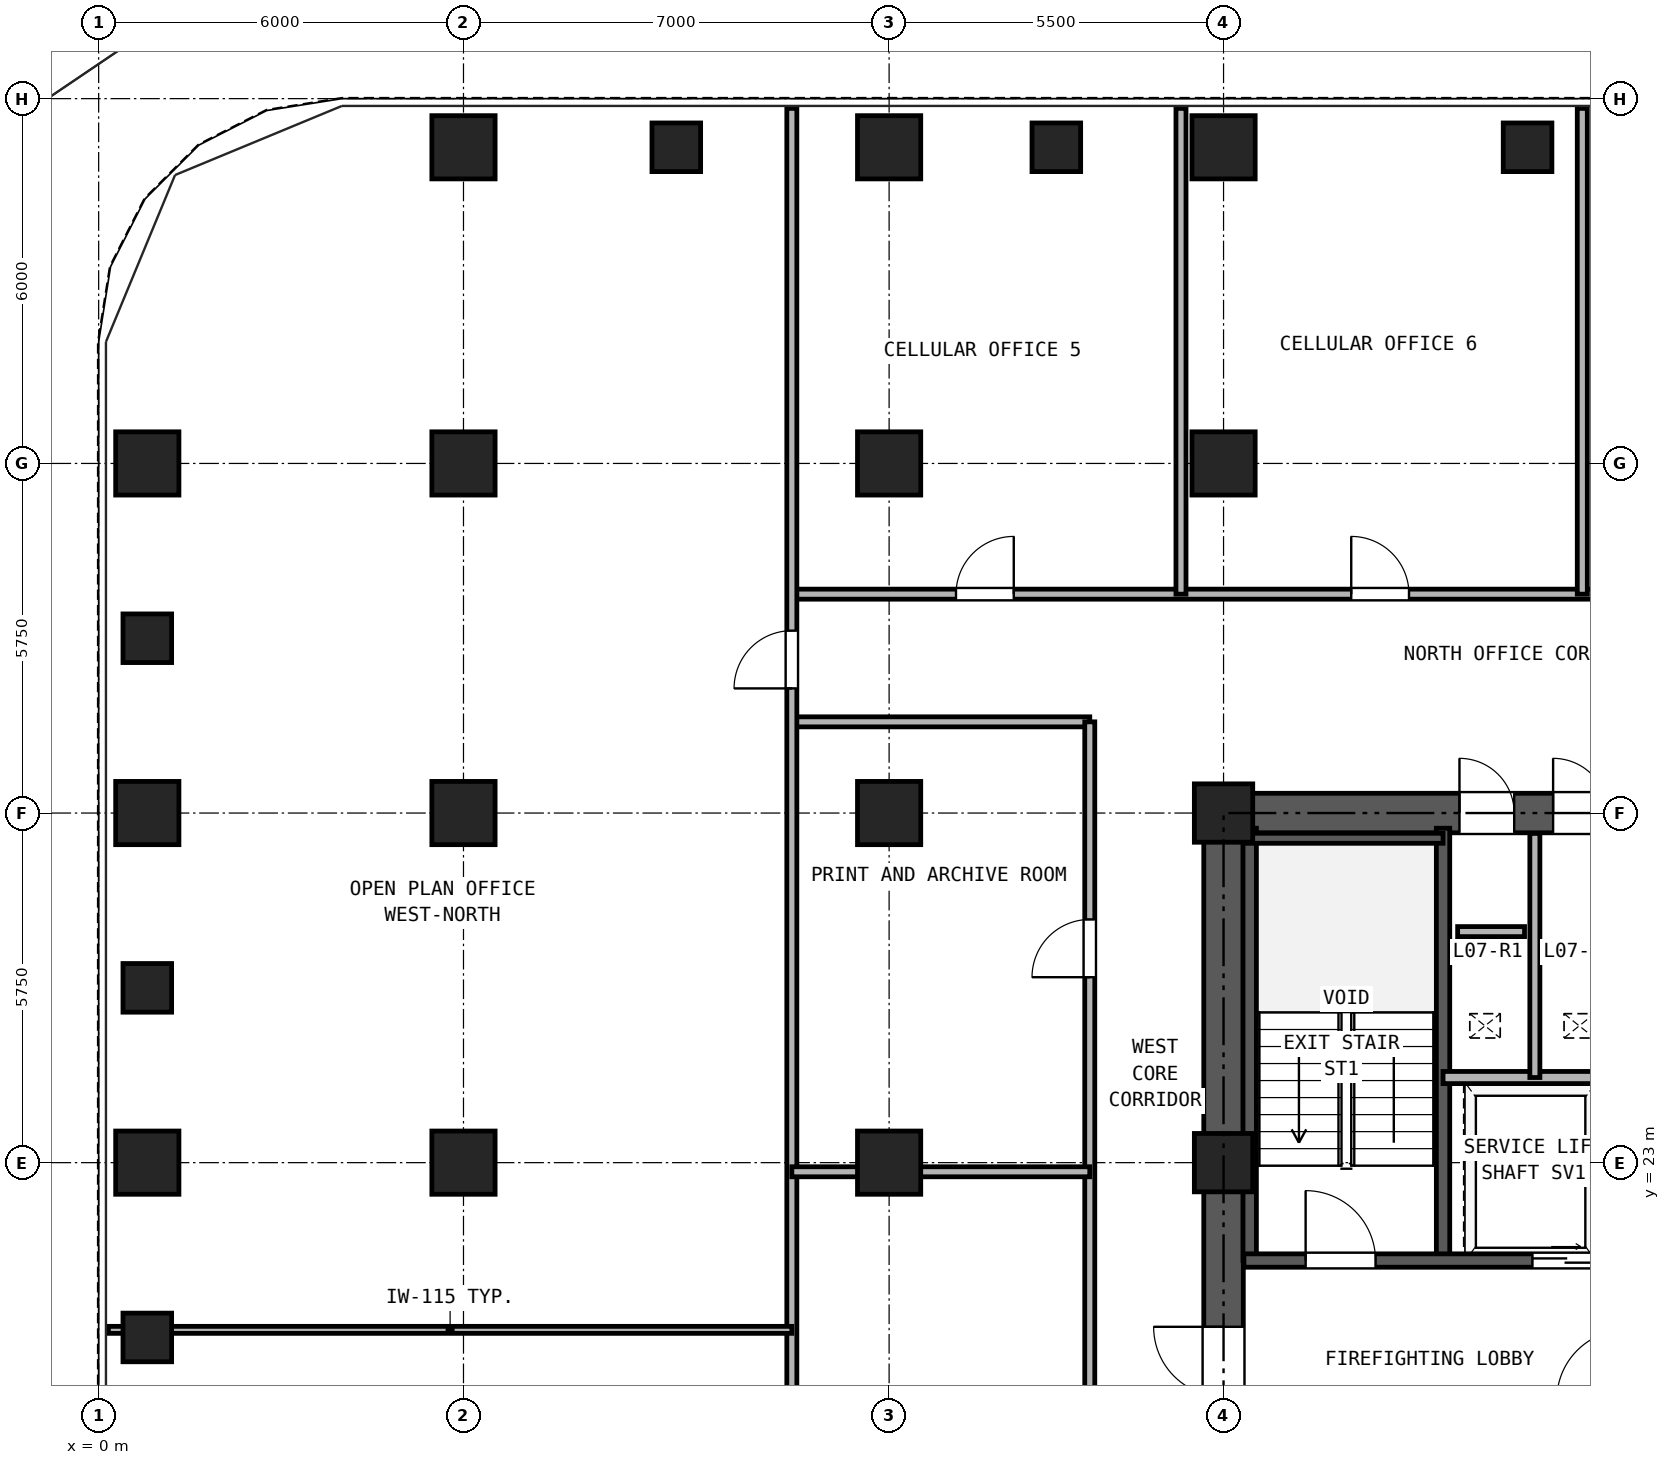
"""IFC4 building model, lengths in metres.
Left out: names, types, materials, properties, quantities, classifications, styles, units other than length and angle.
Written with IfcOpenShell. Run it as: python <this file> out.ifc"""

import sys

from ifc_helpers import new_model, si_unit, direction, frame, frame_2d, origin, origin_2d, place, context, subcontext, project, spatial, rectangle, hollow_rectangle, extrude, source, transform, mapped, element, fill, save


model = new_model("IFC4")
c1 = context("Model", 3, precision=1e-05, world=origin(), true_north=direction((0.0, 1.0)))
c2 = subcontext(c1, "Body", "Model", "MODEL_VIEW")
j1 = project(units=[si_unit("LENGTHUNIT", "METRE"), si_unit("PLANEANGLEUNIT", "RADIAN")], contexts=[c1])
p1 = place(None, origin())
s1 = spatial("IfcSite", under=j1, at=p1, CompositionType="ELEMENT")
p2 = place(p1, origin())
s2 = spatial("IfcBuilding", under=s1, at=p2, CompositionType="ELEMENT")
p3 = place(p2, frame((0.0, 0.0, 29.7)))
s3 = spatial("IfcBuildingStorey", under=s2, at=p3, CompositionType="ELEMENT", Elevation=29.7)
m1 = source(origin(), c2, "Body", "SweptSolid", [
    extrude(hollow_rectangle(XDim=1.04, YDim=1.04, WallThickness=0.065, at=origin_2d()), origin(), (0.0, 0.0, 1.0), 3.32),
])
for number, where, z_axis, x_axis in (
    (1, (6.0, 39.7, 0.0), (0.0, 0.0, 1.0), (1.0, 0.0, 0.0)),
    (2, (13.0, 39.7, 0.0), (0.0, 0.0, 1.0), (1.0, 0.0, 0.0)),
    (3, (18.5, 39.7, 0.0), (0.0, 0.0, 1.0), (1.0, 0.0, 0.0)),
    (4, (0.8, 23.0, 0.0), (0.0, 0.0, 1.0), (1.0, 0.0, 0.0)),
    (5, (0.8, 28.75, 0.0), (0.0, 0.0, 1.0), (1.0, 0.0, 0.0)),
    (6, (0.8, 34.5, 0.0), (0.0, 0.0, 1.0), (1.0, 0.0, 0.0)),
    (7, (6.0, 23.0, 0.0), (0.0, 0.0, 1.0), (1.0, 0.0, 0.0)),
    (8, (6.0, 28.75, 0.0), (0.0, 0.0, 1.0), (1.0, 0.0, 0.0)),
    (9, (6.0, 34.5, 0.0), (0.0, 0.0, 1.0), (1.0, 0.0, 0.0)),
    (10, (13.0, 23.0, 0.0), (0.0, 0.0, 1.0), (1.0, 0.0, 0.0)),
    (11, (13.0, 28.75, 0.0), (0.0, 0.0, 1.0), (1.0, 0.0, 0.0)),
    (12, (13.0, 34.5, 0.0), (0.0, 0.0, 1.0), (1.0, 0.0, 0.0)),
):
    element("IfcColumn", number, at=place(p3, frame(where, z_axis=z_axis, x_axis=x_axis)), inside=s3, PredefinedType="COLUMN", context=c2, shape_type="MappedRepresentation", body=[
        mapped(m1, transform((0.0, 0.0, 0.0), x_axis=(1.0, 0.0, 0.0), y_axis=(0.0, 1.0, 0.0), z_axis=(0.0, 0.0, 1.0), scale=1.0)),
    ])
m2 = source(origin(), c2, "Body", "SweptSolid", [
    extrude(hollow_rectangle(XDim=0.96, YDim=0.96, WallThickness=0.06, at=origin_2d()), origin(), (0.0, 0.0, 1.0), 3.32),
])
for number, where, z_axis, x_axis in (
    (13, (18.5, 23.0, 0.0), (0.0, 0.0, 1.0), (1.0, 0.0, 0.0)),
    (14, (18.5, 28.75, 0.0), (0.0, 0.0, 1.0), (1.0, 0.0, 0.0)),
):
    element("IfcColumn", number, at=place(p3, frame(where, z_axis=z_axis, x_axis=x_axis)), inside=s3, PredefinedType="COLUMN", context=c2, shape_type="MappedRepresentation", body=[
        mapped(m2, transform((0.0, 0.0, 0.0), x_axis=(1.0, 0.0, 0.0), y_axis=(0.0, 1.0, 0.0), z_axis=(0.0, 0.0, 1.0), scale=1.0)),
    ])
p4 = place(p3, frame((18.5, 34.5, 0.0), z_axis=(0.0, 0.0, 1.0), x_axis=(1.0, 0.0, 0.0)))
e15 = element("IfcColumn", 15, at=p4, inside=s3, PredefinedType="COLUMN", context=c2, shape_type="MappedRepresentation", body=[
    mapped(m1, transform((0.0, 0.0, 0.0), x_axis=(1.0, 0.0, 0.0), y_axis=(0.0, 1.0, 0.0), z_axis=(0.0, 0.0, 1.0), scale=1.0)),
])
m3 = source(origin(), c2, "Body", "SweptSolid", [
    extrude(hollow_rectangle(XDim=0.8, YDim=0.8, WallThickness=0.045, at=origin_2d()), origin(), (0.0, 0.0, 1.0), 3.32),
])
for number, where, z_axis, x_axis in (
    (16, (9.5, 39.7, 0.0), (0.0, 0.0, 1.0), (1.0, 0.0, 0.0)),
    (17, (15.75, 39.7, 0.0), (0.0, 0.0, 1.0), (1.0, 0.0, 0.0)),
    (18, (23.5, 39.7, 0.0), (0.0, 0.0, 1.0), (1.0, 0.0, 0.0)),
    (19, (0.8, 20.125, 0.0), (0.0, 0.0, 1.0), (1.0, 0.0, 0.0)),
    (20, (0.8, 25.875, 0.0), (0.0, 0.0, 1.0), (1.0, 0.0, 0.0)),
    (21, (0.8, 31.625, 0.0), (0.0, 0.0, 1.0), (1.0, 0.0, 0.0)),
):
    element("IfcColumn", number, at=place(p3, frame(where, z_axis=z_axis, x_axis=x_axis)), inside=s3, PredefinedType="COLUMN", context=c2, shape_type="MappedRepresentation", body=[
        mapped(m3, transform((0.0, 0.0, 0.0), x_axis=(1.0, 0.0, 0.0), y_axis=(0.0, 1.0, 0.0), z_axis=(0.0, 0.0, 1.0), scale=1.0)),
    ])
p5 = place(p3, frame((18.175, 28.75, 0.0), z_axis=(0.0, 0.0, 1.0), x_axis=(1.0, 0.0, 0.0)))
e22 = element("IfcWall", 22, at=p5, inside=s3, PredefinedType="SHEAR", context=c2, shape_type="SweptSolid", body=[
    extrude(rectangle(XDim=10.65, YDim=0.65, at=frame_2d((5.325, 0.0))), origin(), (0.0, 0.0, 1.0), 3.32),
])
p6 = place(p5, frame((4.205, 0.0, 0.0)))
e23 = element("IfcOpeningElement", 23, at=p6, cuts=e22, PredefinedType="OPENING", context=c2, shape_type="SweptSolid", body=[
    extrude(rectangle(XDim=0.9, YDim=2.05, at=frame_2d((0.45, 1.025))), frame((0.0, 0.335, 0.0), z_axis=(0.0, -1.0, 0.0), x_axis=(1.0, 0.0, 0.0)), (0.0, 0.0, 1.0), 0.67),
])
p7 = place(p5, frame((5.745, 0.0, 0.0)))
e24 = element("IfcOpeningElement", 24, at=p7, cuts=e22, PredefinedType="OPENING", context=c2, shape_type="SweptSolid", body=[
    extrude(rectangle(XDim=0.9, YDim=2.05, at=frame_2d((0.45, 1.025))), frame((0.0, 0.335, 0.0), z_axis=(0.0, -1.0, 0.0), x_axis=(1.0, 0.0, 0.0)), (0.0, 0.0, 1.0), 0.67),
])
p8 = place(p3, frame((18.5, 11.825, 0.0), z_axis=(0.0, 0.0, 1.0), x_axis=(0.0, 1.0, 0.0)))
e25 = element("IfcWall", 25, at=p8, inside=s3, PredefinedType="SHEAR", context=c2, shape_type="SweptSolid", body=[
    extrude(rectangle(XDim=16.6, YDim=0.65, at=frame_2d((8.3, 0.0))), origin(), (0.0, 0.0, 1.0), 3.32),
])
p9 = place(p8, frame((7.325, 0.0, 0.0)))
e26 = element("IfcOpeningElement", 26, at=p9, cuts=e25, PredefinedType="OPENING", context=c2, shape_type="SweptSolid", body=[
    extrude(rectangle(XDim=1.15, YDim=2.2, at=frame_2d((0.575, 1.1))), frame((0.0, 0.335, 0.0), z_axis=(0.0, -1.0, 0.0), x_axis=(1.0, 0.0, 0.0)), (0.0, 0.0, 1.0), 0.67),
])
for number, where, z_axis, x_axis in (
    (27, (18.93, 21.39, 0.0), (0.0, 0.0, 1.0), (0.0, 1.0, 0.0)),
    (28, (22.11, 21.39, 0.0), (0.0, 0.0, 1.0), (0.0, 1.0, 0.0)),
):
    element("IfcWall", number, at=place(p3, frame(where, z_axis=z_axis, x_axis=x_axis)), inside=s3, PredefinedType="SOLIDWALL", context=c2, shape_type="SweptSolid", body=[
        extrude(rectangle(XDim=7.11, YDim=0.22, at=frame_2d((3.555, 0.0))), origin(), (0.0, 0.0, 1.0), 3.32),
    ])
p10 = place(p3, frame((18.835, 28.335, 0.0), z_axis=(0.0, 0.0, 1.0), x_axis=(1.0, 0.0, 0.0)))
e29 = element("IfcWall", 29, at=p10, inside=s3, PredefinedType="PARTITIONING", context=c2, shape_type="SweptSolid", body=[
    extrude(rectangle(XDim=3.275, YDim=0.165, at=frame_2d((1.638, 0.0))), origin(), (0.0, 0.0, 1.0), 3.32),
])
p11 = place(p3, frame((18.835, 21.39, 0.0), z_axis=(0.0, 0.0, 1.0), x_axis=(1.0, 0.0, 0.0)))
e30 = element("IfcWall", 30, at=p11, inside=s3, PredefinedType="SOLIDWALL", context=c2, shape_type="SweptSolid", body=[
    extrude(rectangle(XDim=6.295, YDim=0.22, at=frame_2d((3.147, 0.0))), origin(), (0.0, 0.0, 1.0), 3.32),
])
p12 = place(p11, frame((1.015, 0.0, 0.0)))
e31 = element("IfcOpeningElement", 31, at=p12, cuts=e30, PredefinedType="OPENING", context=c2, shape_type="SweptSolid", body=[
    extrude(rectangle(XDim=1.15, YDim=2.2, at=frame_2d((0.575, 1.1))), frame((0.0, 0.12, 0.0), z_axis=(0.0, -1.0, 0.0), x_axis=(1.0, 0.0, 0.0)), (0.0, 0.0, 1.0), 0.24),
])
p13 = place(p11, frame((4.745, 0.0, 0.0)))
e32 = element("IfcOpeningElement", 32, at=p13, cuts=e30, PredefinedType="OPENING", context=c2, shape_type="SweptSolid", body=[
    extrude(rectangle(XDim=1.1, YDim=2.25, at=frame_2d((0.55, 1.125))), frame((0.0, 0.12, 0.0), z_axis=(0.0, -1.0, 0.0), x_axis=(1.0, 0.0, 0.0)), (0.0, 0.0, 1.0), 0.24),
])
p14 = place(p3, frame((22.11, 24.4, 0.0), z_axis=(0.0, 0.0, 1.0), x_axis=(1.0, 0.0, 0.0)))
e33 = element("IfcWall", 33, at=p14, inside=s3, PredefinedType="PARTITIONING", context=c2, shape_type="SweptSolid", body=[
    extrude(rectangle(XDim=3.02, YDim=0.2, at=frame_2d((1.51, 0.0))), origin(), (0.0, 0.0, 1.0), 3.32),
])
p15 = place(p3, frame((23.62, 24.4, 0.0), z_axis=(0.0, 0.0, 1.0), x_axis=(0.0, 1.0, 0.0)))
e34 = element("IfcWall", 34, at=p15, inside=s3, PredefinedType="PARTITIONING", context=c2, shape_type="SweptSolid", body=[
    extrude(rectangle(XDim=4.015, YDim=0.165, at=frame_2d((2.008, 0.0))), origin(), (0.0, 0.0, 1.0), 3.32),
])
p16 = place(p3, frame((11.4, 32.35, 0.0), z_axis=(0.0, 0.0, 1.0), x_axis=(1.0, 0.0, 0.0)))
e35 = element("IfcWall", 35, at=p16, inside=s3, PredefinedType="PARTITIONING", context=c2, shape_type="SweptSolid", body=[
    extrude(rectangle(XDim=24.2, YDim=0.165, at=frame_2d((12.1, 0.0))), origin(), (0.0, 0.0, 1.0), 3.32),
])
p17 = place(p16, frame((2.7, 0.0, 0.0)))
e36 = element("IfcOpeningElement", 36, at=p17, cuts=e35, PredefinedType="OPENING", context=c2, shape_type="SweptSolid", body=[
    extrude(rectangle(XDim=0.95, YDim=2.15, at=frame_2d((0.475, 1.075))), frame((0.0, 0.093, 0.0), z_axis=(0.0, -1.0, 0.0), x_axis=(1.0, 0.0, 0.0)), (0.0, 0.0, 1.0), 0.185),
])
p18 = place(p16, frame((9.2, 0.0, 0.0)))
e37 = element("IfcOpeningElement", 37, at=p18, cuts=e35, PredefinedType="OPENING", context=c2, shape_type="SweptSolid", body=[
    extrude(rectangle(XDim=0.95, YDim=2.15, at=frame_2d((0.475, 1.075))), frame((0.0, 0.093, 0.0), z_axis=(0.0, -1.0, 0.0), x_axis=(1.0, 0.0, 0.0)), (0.0, 0.0, 1.0), 0.185),
])
p19 = place(p16, frame((15.9, 0.0, 0.0)))
e38 = element("IfcOpeningElement", 38, at=p19, cuts=e35, PredefinedType="OPENING", context=c2, shape_type="SweptSolid", body=[
    extrude(rectangle(XDim=0.95, YDim=2.15, at=frame_2d((0.475, 1.075))), frame((0.0, 0.093, 0.0), z_axis=(0.0, -1.0, 0.0), x_axis=(1.0, 0.0, 0.0)), (0.0, 0.0, 1.0), 0.185),
])
p20 = place(p16, frame((21.5, 0.0, 0.0)))
e39 = element("IfcOpeningElement", 39, at=p20, cuts=e35, PredefinedType="OPENING", context=c2, shape_type="SweptSolid", body=[
    extrude(rectangle(XDim=0.95, YDim=2.15, at=frame_2d((0.475, 1.075))), frame((0.0, 0.093, 0.0), z_axis=(0.0, -1.0, 0.0), x_axis=(1.0, 0.0, 0.0)), (0.0, 0.0, 1.0), 0.185),
])
p21 = place(p3, frame((11.4, 30.25, 0.0), z_axis=(0.0, 0.0, 1.0), x_axis=(1.0, 0.0, 0.0)))
e40 = element("IfcWall", 40, at=p21, inside=s3, PredefinedType="PARTITIONING", context=c2, shape_type="SweptSolid", body=[
    extrude(rectangle(XDim=4.9, YDim=0.165, at=frame_2d((2.45, 0.0))), origin(), (0.0, 0.0, 1.0), 3.32),
])
p22 = place(p3, frame((16.3, 9.45, 0.0), z_axis=(0.0, 0.0, 1.0), x_axis=(0.0, 1.0, 0.0)))
e41 = element("IfcWall", 41, at=p22, inside=s3, PredefinedType="PARTITIONING", context=c2, shape_type="SweptSolid", body=[
    extrude(rectangle(XDim=20.8, YDim=0.165, at=frame_2d((10.4, 0.0))), origin(), (0.0, 0.0, 1.0), 3.32),
])
p23 = place(p22, frame((6.2, 0.0, 0.0)))
e42 = element("IfcOpeningElement", 42, at=p23, cuts=e41, PredefinedType="OPENING", context=c2, shape_type="SweptSolid", body=[
    extrude(rectangle(XDim=0.95, YDim=2.15, at=frame_2d((0.475, 1.075))), frame((0.0, 0.093, 0.0), z_axis=(0.0, -1.0, 0.0), x_axis=(1.0, 0.0, 0.0)), (0.0, 0.0, 1.0), 0.185),
])
p24 = place(p22, frame((16.6, 0.0, 0.0)))
e43 = element("IfcOpeningElement", 43, at=p24, cuts=e41, PredefinedType="OPENING", context=c2, shape_type="SweptSolid", body=[
    extrude(rectangle(XDim=0.95, YDim=2.15, at=frame_2d((0.475, 1.075))), frame((0.0, 0.093, 0.0), z_axis=(0.0, -1.0, 0.0), x_axis=(1.0, 0.0, 0.0)), (0.0, 0.0, 1.0), 0.185),
])
p25 = place(p3, frame((11.4, 0.16, 0.0), z_axis=(0.0, 0.0, 1.0), x_axis=(0.0, 1.0, 0.0)))
e44 = element("IfcWall", 44, at=p25, inside=s3, PredefinedType="PARTITIONING", context=c2, shape_type="SweptSolid", body=[
    extrude(rectangle(XDim=40.18, YDim=0.165, at=frame_2d((20.09, 0.0))), origin(), (0.0, 0.0, 1.0), 3.32),
])
p26 = place(p25, frame((7.74, 0.0, 0.0)))
e45 = element("IfcOpeningElement", 45, at=p26, cuts=e44, PredefinedType="OPENING", context=c2, shape_type="SweptSolid", body=[
    extrude(rectangle(XDim=0.95, YDim=2.15, at=frame_2d((0.475, 1.075))), frame((0.0, 0.093, 0.0), z_axis=(0.0, -1.0, 0.0), x_axis=(1.0, 0.0, 0.0)), (0.0, 0.0, 1.0), 0.185),
])
p27 = place(p25, frame((30.64, 0.0, 0.0)))
e46 = element("IfcOpeningElement", 46, at=p27, cuts=e44, PredefinedType="OPENING", context=c2, shape_type="SweptSolid", body=[
    extrude(rectangle(XDim=0.95, YDim=2.15, at=frame_2d((0.475, 1.075))), frame((0.0, 0.093, 0.0), z_axis=(0.0, -1.0, 0.0), x_axis=(1.0, 0.0, 0.0)), (0.0, 0.0, 1.0), 0.185),
])
for number, where, z_axis, x_axis in (
    (47, (17.8, 32.35, 0.0), (0.0, 0.0, 1.0), (0.0, 1.0, 0.0)),
    (48, (24.4, 32.35, 0.0), (0.0, 0.0, 1.0), (0.0, 1.0, 0.0)),
):
    element("IfcWall", number, at=place(p3, frame(where, z_axis=z_axis, x_axis=x_axis)), inside=s3, PredefinedType="PARTITIONING", context=c2, shape_type="SweptSolid", body=[
        extrude(rectangle(XDim=7.99, YDim=0.165, at=frame_2d((3.995, 0.0))), origin(), (0.0, 0.0, 1.0), 3.32),
    ])
p28 = place(p3, frame((0.16, 20.25, 0.0), z_axis=(0.0, 0.0, 1.0), x_axis=(1.0, 0.0, 0.0)))
e49 = element("IfcWall", 49, at=p28, inside=s3, PredefinedType="PARTITIONING", context=c2, shape_type="SweptSolid", body=[
    extrude(rectangle(XDim=11.24, YDim=0.115, at=frame_2d((5.62, 0.0))), origin(), (0.0, 0.0, 1.0), 2.898),
])
p29 = place(p3, frame((11.4, 22.85, 0.0), z_axis=(0.0, 0.0, 1.0), x_axis=(1.0, 0.0, 0.0)))
e50 = element("IfcWall", 50, at=p29, inside=s3, PredefinedType="PARTITIONING", context=c2, shape_type="SweptSolid", body=[
    extrude(rectangle(XDim=4.9, YDim=0.165, at=frame_2d((2.45, 0.0))), origin(), (0.0, 0.0, 1.0), 2.539),
])
p30 = place(p3, frame((22.35, 26.8, 0.0), z_axis=(0.0, 0.0, 1.0), x_axis=(1.0, 0.0, 0.0)))
e51 = element("IfcWall", 51, at=p30, inside=s3, PredefinedType="PARTITIONING", context=c2, shape_type="SweptSolid", body=[
    extrude(rectangle(XDim=1.1, YDim=0.165, at=frame_2d((0.55, 0.0))), origin(), (0.0, 0.0, 1.0), 3.32),
])
p31 = place(p12, frame((1.15, 0.0, 0.0), z_axis=(0.0, 0.0, 1.0), x_axis=(-1.0, 0.0, 0.0)))
e52 = element("IfcDoor", 52, at=p31, inside=s3, OperationType="SINGLE_SWING_LEFT", PredefinedType="DOOR", context=c2, shape_type="SweptSolid", body=[
    extrude(rectangle(XDim=1.15, YDim=2.2, at=frame_2d((0.575, 1.1))), frame((0.0, 0.025, 0.0), z_axis=(0.0, -1.0, 0.0), x_axis=(1.0, 0.0, 0.0)), (0.0, 0.0, 1.0), 0.05),
])
fill(e31, e52)
p32 = place(p13, frame((1.1, 0.0, 0.0), z_axis=(0.0, 0.0, 1.0), x_axis=(-1.0, 0.0, 0.0)))
e53 = element("IfcDoor", 53, at=p32, inside=s3, OperationType="DOUBLE_DOOR_SLIDING", PredefinedType="DOOR", context=c2, shape_type="SweptSolid", body=[
    extrude(rectangle(XDim=1.1, YDim=2.25, at=frame_2d((0.55, 1.125))), frame((0.0, 0.025, 0.0), z_axis=(0.0, -1.0, 0.0), x_axis=(1.0, 0.0, 0.0)), (0.0, 0.0, 1.0), 0.05),
])
fill(e32, e53)
p33 = place(p9, frame((1.15, 0.0, 0.0), z_axis=(0.0, 0.0, 1.0), x_axis=(-1.0, 0.0, 0.0)))
e54 = element("IfcDoor", 54, at=p33, inside=s3, OperationType="SINGLE_SWING_RIGHT", PredefinedType="DOOR", context=c2, shape_type="SweptSolid", body=[
    extrude(rectangle(XDim=1.15, YDim=2.2, at=frame_2d((0.575, 1.1))), frame((0.0, 0.025, 0.0), z_axis=(0.0, -1.0, 0.0), x_axis=(1.0, 0.0, 0.0)), (0.0, 0.0, 1.0), 0.05),
])
fill(e26, e54)
p34 = place(p6, origin())
e55 = element("IfcDoor", 55, at=p34, inside=s3, OperationType="SINGLE_SWING_LEFT", PredefinedType="DOOR", context=c2, shape_type="SweptSolid", body=[
    extrude(rectangle(XDim=0.9, YDim=2.05, at=frame_2d((0.45, 1.025))), frame((0.0, 0.025, 0.0), z_axis=(0.0, -1.0, 0.0), x_axis=(1.0, 0.0, 0.0)), (0.0, 0.0, 1.0), 0.05),
])
fill(e23, e55)
p35 = place(p7, origin())
e56 = element("IfcDoor", 56, at=p35, inside=s3, OperationType="SINGLE_SWING_LEFT", PredefinedType="DOOR", context=c2, shape_type="SweptSolid", body=[
    extrude(rectangle(XDim=0.9, YDim=2.05, at=frame_2d((0.45, 1.025))), frame((0.0, 0.025, 0.0), z_axis=(0.0, -1.0, 0.0), x_axis=(1.0, 0.0, 0.0)), (0.0, 0.0, 1.0), 0.05),
])
fill(e24, e56)
p36 = place(p17, origin())
e57 = element("IfcDoor", 57, at=p36, inside=s3, OperationType="SINGLE_SWING_RIGHT", PredefinedType="DOOR", context=c2, shape_type="SweptSolid", body=[
    extrude(rectangle(XDim=0.95, YDim=2.15, at=frame_2d((0.475, 1.075))), frame((0.0, 0.025, 0.0), z_axis=(0.0, -1.0, 0.0), x_axis=(1.0, 0.0, 0.0)), (0.0, 0.0, 1.0), 0.05),
])
fill(e36, e57)
p37 = place(p18, origin())
e58 = element("IfcDoor", 58, at=p37, inside=s3, OperationType="SINGLE_SWING_LEFT", PredefinedType="DOOR", context=c2, shape_type="SweptSolid", body=[
    extrude(rectangle(XDim=0.95, YDim=2.15, at=frame_2d((0.475, 1.075))), frame((0.0, 0.025, 0.0), z_axis=(0.0, -1.0, 0.0), x_axis=(1.0, 0.0, 0.0)), (0.0, 0.0, 1.0), 0.05),
])
fill(e37, e58)
p38 = place(p27, frame((0.95, 0.0, 0.0), z_axis=(0.0, 0.0, 1.0), x_axis=(-1.0, 0.0, 0.0)))
e59 = element("IfcDoor", 59, at=p38, inside=s3, OperationType="SINGLE_SWING_LEFT", PredefinedType="DOOR", context=c2, shape_type="SweptSolid", body=[
    extrude(rectangle(XDim=0.95, YDim=2.15, at=frame_2d((0.475, 1.075))), frame((0.0, 0.025, 0.0), z_axis=(0.0, -1.0, 0.0), x_axis=(1.0, 0.0, 0.0)), (0.0, 0.0, 1.0), 0.05),
])
fill(e46, e59)
p39 = place(p24, frame((0.95, 0.0, 0.0), z_axis=(0.0, 0.0, 1.0), x_axis=(-1.0, 0.0, 0.0)))
e60 = element("IfcDoor", 60, at=p39, inside=s3, OperationType="SINGLE_SWING_LEFT", PredefinedType="DOOR", context=c2, shape_type="SweptSolid", body=[
    extrude(rectangle(XDim=0.95, YDim=2.15, at=frame_2d((0.475, 1.075))), frame((0.0, 0.025, 0.0), z_axis=(0.0, -1.0, 0.0), x_axis=(1.0, 0.0, 0.0)), (0.0, 0.0, 1.0), 0.05),
])
fill(e43, e60)
save(model, sys.argv[1])
